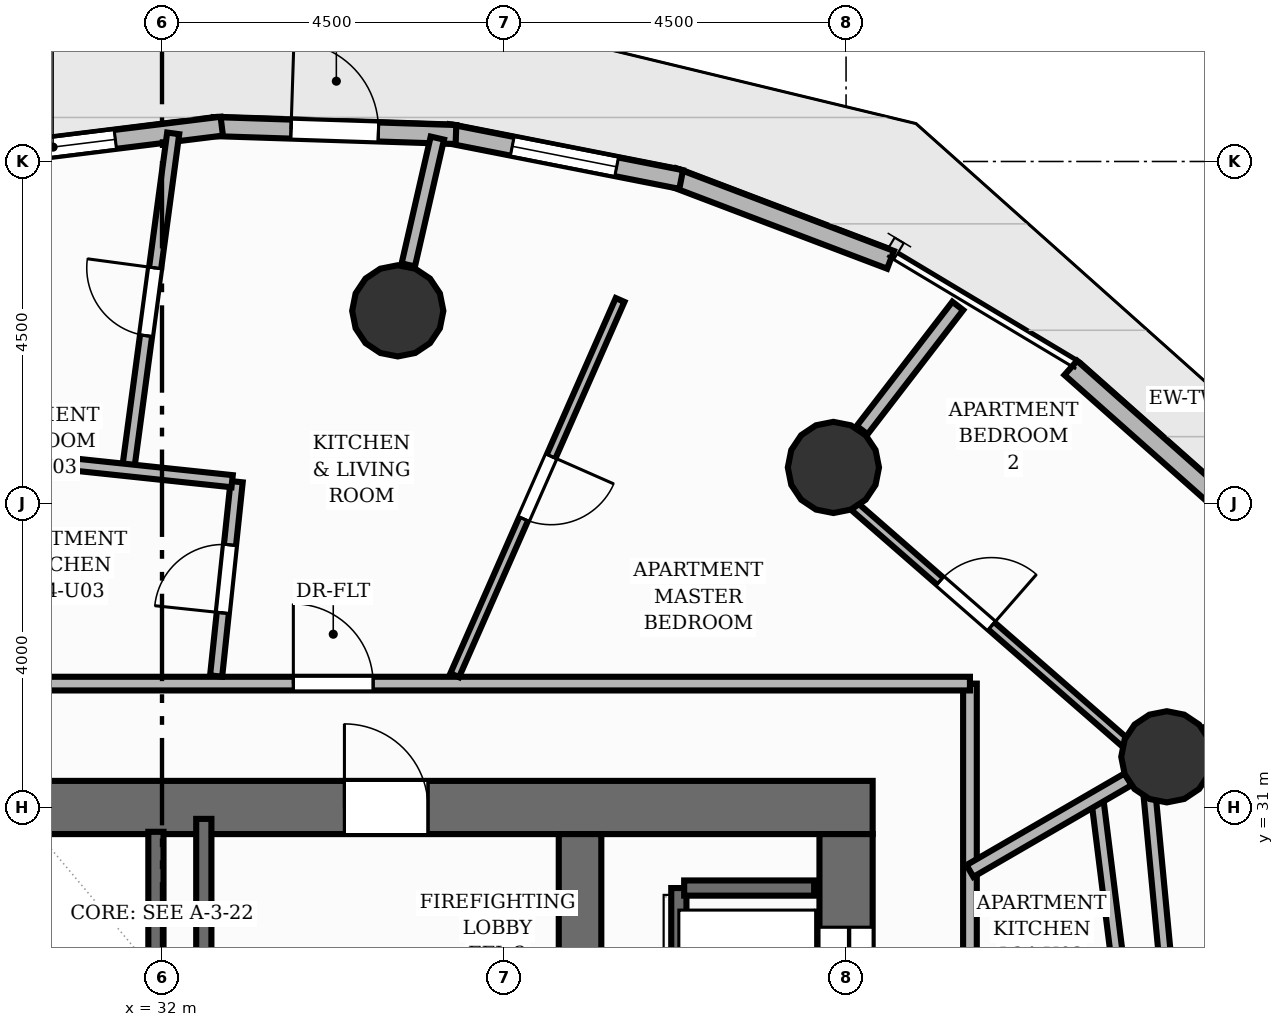
"""IFC4 building model, lengths in metres.
Left out: names, types, materials, properties, quantities, classifications, styles, units other than length and angle.
Written with IfcOpenShell. Run it as: python <this file> out.ifc"""

import sys

from ifc_helpers import new_model, si_unit, direction, frame, frame_2d, origin, origin_2d, place, context, subcontext, project, spatial, rectangle, circle, extrude, element, fill, save


model = new_model("IFC4")
c1 = context("Model", 3, precision=1e-05, world=origin(), true_north=direction((0.0, 1.0)))
c2 = subcontext(c1, "Body", "Model", "MODEL_VIEW")
j1 = project(units=[si_unit("LENGTHUNIT", "METRE"), si_unit("PLANEANGLEUNIT", "RADIAN")], contexts=[c1])
p1 = place(None, origin())
s1 = spatial("IfcSite", under=j1, at=p1, CompositionType="ELEMENT")
p2 = place(p1, origin())
s2 = spatial("IfcBuilding", under=s1, at=p2, CompositionType="ELEMENT")
p3 = place(p2, frame((0.0, 0.0, 83.68)))
s3 = spatial("IfcBuildingStorey", under=s2, at=p3, CompositionType="ELEMENT", Elevation=83.68)
p4 = place(p3, frame((22.65, 31.0, 0.0), z_axis=(0.0, 0.0, 1.0), x_axis=(1.0, 0.0, 0.0)))
e1 = element("IfcWall", 1, at=p4, inside=s3, PredefinedType="SHEAR", context=c2, shape_type="SweptSolid", body=[
    extrude(rectangle(XDim=18.7, YDim=0.7, at=frame_2d((9.35, 0.0))), origin(), (0.0, 0.0, 1.0), 3.2),
])
p5 = place(p4, frame((11.75, 0.0, 0.0)))
e2 = element("IfcOpeningElement", 2, at=p5, cuts=e1, PredefinedType="OPENING", context=c2, shape_type="SweptSolid", body=[
    extrude(rectangle(XDim=1.1, YDim=2.15, at=frame_2d((0.55, 1.075))), frame((0.0, 0.36, 0.0), z_axis=(0.0, -1.0, 0.0), x_axis=(1.0, 0.0, 0.0)), (0.0, 0.0, 1.0), 0.72),
])
p6 = place(p3, frame((41.0, 17.35, 0.0), z_axis=(0.0, 0.0, 1.0), x_axis=(0.0, 1.0, 0.0)))
e3 = element("IfcWall", 3, at=p6, inside=s3, PredefinedType="SHEAR", context=c2, shape_type="SweptSolid", body=[
    extrude(rectangle(XDim=13.3, YDim=0.7, at=frame_2d((6.65, 0.0))), origin(), (0.0, 0.0, 1.0), 3.2),
])
p7 = place(p6, frame((1.225, 0.0, 0.0)))
e4 = element("IfcOpeningElement", 4, at=p7, cuts=e3, PredefinedType="OPENING", context=c2, shape_type="SweptSolid", body=[
    extrude(rectangle(XDim=1.05, YDim=2.15, at=frame_2d((0.525, 1.075))), frame((0.0, 0.36, 0.0), z_axis=(0.0, -1.0, 0.0), x_axis=(1.0, 0.0, 0.0)), (0.0, 0.0, 1.0), 0.72),
])
p8 = place(p6, frame((4.475, 0.0, 0.0)))
e5 = element("IfcOpeningElement", 5, at=p8, cuts=e3, PredefinedType="OPENING", context=c2, shape_type="SweptSolid", body=[
    extrude(rectangle(XDim=1.05, YDim=2.15, at=frame_2d((0.525, 1.075))), frame((0.0, 0.36, 0.0), z_axis=(0.0, -1.0, 0.0), x_axis=(1.0, 0.0, 0.0)), (0.0, 0.0, 1.0), 0.72),
])
p9 = place(p6, frame((7.775, 0.0, 0.0)))
e6 = element("IfcOpeningElement", 6, at=p9, cuts=e3, PredefinedType="OPENING", context=c2, shape_type="SweptSolid", body=[
    extrude(rectangle(XDim=1.05, YDim=2.15, at=frame_2d((0.525, 1.075))), frame((0.0, 0.36, 0.0), z_axis=(0.0, -1.0, 0.0), x_axis=(1.0, 0.0, 0.0)), (0.0, 0.0, 1.0), 0.72),
])
p10 = place(p6, frame((11.025, 0.0, 0.0)))
e7 = element("IfcOpeningElement", 7, at=p10, cuts=e3, PredefinedType="OPENING", context=c2, shape_type="SweptSolid", body=[
    extrude(rectangle(XDim=1.05, YDim=2.15, at=frame_2d((0.525, 1.075))), frame((0.0, 0.36, 0.0), z_axis=(0.0, -1.0, 0.0), x_axis=(1.0, 0.0, 0.0)), (0.0, 0.0, 1.0), 0.72),
])
p11 = place(p3, frame((37.5, 17.35, 0.0), z_axis=(0.0, 0.0, 1.0), x_axis=(0.0, 1.0, 0.0)))
e8 = element("IfcWall", 8, at=p11, inside=s3, PredefinedType="SHEAR", context=c2, shape_type="SweptSolid", body=[
    extrude(rectangle(XDim=13.3, YDim=0.56, at=frame_2d((6.65, 0.0))), origin(), (0.0, 0.0, 1.0), 3.2),
])
for number, where, z_axis, x_axis in (
    (9, (45.22, 31.667, 0.0), (0.0, 0.0, 1.0), (1.0, 0.0, 0.0)),
    (10, (40.833, 35.474, 0.0), (0.0, 0.0, 1.0), (1.0, 0.0, 0.0)),
    (11, (35.102, 37.535, 0.0), (0.0, 0.0, 1.0), (1.0, 0.0, 0.0)),
):
    element("IfcColumn", number, at=place(p3, frame(where, z_axis=z_axis, x_axis=x_axis)), inside=s3, PredefinedType="COLUMN", context=c2, shape_type="SweptSolid", body=[
        extrude(circle(Radius=0.6, at=origin_2d()), origin(), (0.0, 0.0, 1.0), 3.2),
    ])
p12 = place(p3, frame((43.957, 36.784, 0.0), z_axis=(0.0, 0.0, 1.0), x_axis=(0.747828492436, -0.663891968547, 0.0)))
e12 = element("IfcWall", 12, at=p12, inside=s3, PredefinedType="SOLIDWALL", context=c2, shape_type="SweptSolid", body=[
    extrude(rectangle(XDim=2.923, YDim=0.25, at=frame_2d((1.461, 0.0))), origin(), (0.0, 0.0, 1.0), 2.96),
])
p13 = place(p3, frame((38.724, 39.293, 0.0), z_axis=(0.0, 0.0, 1.0), x_axis=(0.934815891493, -0.355132720277, 0.0)))
e13 = element("IfcWall", 13, at=p13, inside=s3, PredefinedType="SOLIDWALL", context=c2, shape_type="SweptSolid", body=[
    extrude(rectangle(XDim=3.061, YDim=0.25, at=frame_2d((1.53, 0.0))), origin(), (0.0, 0.0, 1.0), 2.96),
])
p14 = place(p3, frame((35.758, 39.867, 0.0), z_axis=(0.0, 0.0, 1.0), x_axis=(0.981187677549, -0.193056316721, 0.0)))
e14 = element("IfcWall", 14, at=p14, inside=s3, PredefinedType="SOLIDWALL", context=c2, shape_type="SweptSolid", body=[
    extrude(rectangle(XDim=3.131, YDim=0.25, at=frame_2d((1.565, 0.0))), origin(), (0.0, 0.0, 1.0), 2.96),
])
p15 = place(p14, frame((0.866, 0.0, 0.85)))
e15 = element("IfcOpeningElement", 15, at=p15, cuts=e14, PredefinedType="OPENING", context=c2, shape_type="SweptSolid", body=[
    extrude(rectangle(XDim=1.4, YDim=1.55, at=frame_2d((0.7, 0.775))), frame((0.0, 0.135, 0.0), z_axis=(0.0, -1.0, 0.0), x_axis=(1.0, 0.0, 0.0)), (0.0, 0.0, 1.0), 0.27),
])
p16 = place(p3, frame((32.677, 39.959, 0.0), z_axis=(0.0, 0.0, 1.0), x_axis=(0.999464092211, -0.032734208101, 0.0)))
e16 = element("IfcWall", 16, at=p16, inside=s3, PredefinedType="SOLIDWALL", context=c2, shape_type="SweptSolid", body=[
    extrude(rectangle(XDim=3.192, YDim=0.25, at=frame_2d((1.596, 0.0))), origin(), (0.0, 0.0, 1.0), 2.96),
])
p17 = place(p16, frame((1.021, 0.0, 0.0)))
e17 = element("IfcOpeningElement", 17, at=p17, cuts=e16, PredefinedType="OPENING", context=c2, shape_type="SweptSolid", body=[
    extrude(rectangle(XDim=1.15, YDim=2.2, at=frame_2d((0.575, 1.1))), frame((0.0, 0.135, 0.0), z_axis=(0.0, -1.0, 0.0), x_axis=(1.0, 0.0, 0.0)), (0.0, 0.0, 1.0), 0.27),
])
p18 = place(p3, frame((29.575, 39.566, 0.0), z_axis=(0.0, 0.0, 1.0), x_axis=(0.99241077266, 0.122966899235, 0.0)))
e18 = element("IfcWall", 18, at=p18, inside=s3, PredefinedType="SOLIDWALL", context=c2, shape_type="SweptSolid", body=[
    extrude(rectangle(XDim=3.236, YDim=0.25, at=frame_2d((1.618, 0.0))), origin(), (0.0, 0.0, 1.0), 2.96),
])
p19 = place(p18, frame((0.175, 0.0, 0.85)))
e19 = element("IfcOpeningElement", 19, at=p19, cuts=e18, PredefinedType="OPENING", context=c2, shape_type="SweptSolid", body=[
    extrude(rectangle(XDim=1.65, YDim=1.55, at=frame_2d((0.825, 0.775))), frame((0.0, 0.135, 0.0), z_axis=(0.0, -1.0, 0.0), x_axis=(1.0, 0.0, 0.0)), (0.0, 0.0, 1.0), 0.27),
])
p20 = place(p3, frame((32.55, 27.35, 0.0), z_axis=(0.0, 0.0, 1.0), x_axis=(0.0, 1.0, 0.0)))
e20 = element("IfcWall", 20, at=p20, inside=s3, PredefinedType="SHEAR", context=c2, shape_type="SweptSolid", body=[
    extrude(rectangle(XDim=3.5, YDim=0.2, at=frame_2d((1.75, 0.0))), origin(), (0.0, 0.0, 1.0), 3.2),
])
p21 = place(p3, frame((38.8, 18.06, 0.0), z_axis=(0.0, 0.0, 1.0), x_axis=(0.0, 1.0, 0.0)))
e21 = element("IfcWall", 21, at=p21, inside=s3, PredefinedType="SHEAR", context=c2, shape_type="SweptSolid", body=[
    extrude(rectangle(XDim=11.88, YDim=0.2, at=frame_2d((5.94, 0.0))), origin(), (0.0, 0.0, 1.0), 3.2),
])
p22 = place(p3, frame((38.87, 29.94, 0.0), z_axis=(0.0, 0.0, 1.0), x_axis=(1.0, 0.0, 0.0)))
e22 = element("IfcWall", 22, at=p22, inside=s3, PredefinedType="SHEAR", context=c2, shape_type="SweptSolid", body=[
    extrude(rectangle(XDim=1.71, YDim=0.2, at=frame_2d((0.855, 0.0))), origin(), (0.0, 0.0, 1.0), 3.2),
])
p23 = place(p3, frame((31.92, 29.02, 0.0), z_axis=(0.0, 0.0, 1.0), x_axis=(0.0, 1.0, 0.0)))
e23 = element("IfcWall", 23, at=p23, inside=s3, PredefinedType="SHEAR", context=c2, shape_type="SweptSolid", body=[
    extrude(rectangle(XDim=1.66, YDim=0.2, at=frame_2d((0.83, 0.0))), origin(), (0.0, 0.0, 1.0), 3.2),
])
p24 = place(p3, frame((45.757, 31.978, 0.0), z_axis=(0.0, 0.0, 1.0), x_axis=(0.865046065875, 0.501692439563, 0.0)))
e24 = element("IfcWall", 24, at=p24, inside=s3, PredefinedType="PARTITIONING", context=c2, shape_type="SweptSolid", body=[
    extrude(rectangle(XDim=1.994, YDim=0.18, at=frame_2d((0.997, 0.0))), origin(), (0.0, 0.0, 1.0), 2.261),
])
p25 = place(p3, frame((41.212, 35.966, 0.0), z_axis=(0.0, 0.0, 1.0), x_axis=(0.609991040385, 0.792408310564, 0.0)))
e25 = element("IfcWall", 25, at=p25, inside=s3, PredefinedType="PARTITIONING", context=c2, shape_type="SweptSolid", body=[
    extrude(rectangle(XDim=2.062, YDim=0.18, at=frame_2d((1.031, 0.0))), origin(), (0.0, 0.0, 1.0), 2.261),
])
p26 = place(p3, frame((35.24, 38.139, 0.0), z_axis=(0.0, 0.0, 1.0), x_axis=(0.223359217097, 0.974736200281, 0.0)))
e26 = element("IfcWall", 26, at=p26, inside=s3, PredefinedType="PARTITIONING", context=c2, shape_type="SweptSolid", body=[
    extrude(rectangle(XDim=1.712, YDim=0.18, at=frame_2d((0.856, 0.0))), origin(), (0.0, 0.0, 1.0), 2.261),
])
p27 = place(p3, frame((42.63, 32.63, 0.0), z_axis=(0.0, 0.0, 1.0), x_axis=(0.0, -1.0, 0.0)))
e27 = element("IfcWall", 27, at=p27, inside=s3, PredefinedType="PARTITIONING", context=c2, shape_type="SweptSolid", body=[
    extrude(rectangle(XDim=6.23, YDim=0.18, at=frame_2d((3.115, 0.0))), origin(), (0.0, 0.0, 1.0), 2.955),
])
p28 = place(p3, frame((22.351, 32.63, 0.0), z_axis=(0.0, 0.0, 1.0), x_axis=(1.0, 0.0, 0.0)))
e28 = element("IfcWall", 28, at=p28, inside=s3, PredefinedType="PARTITIONING", context=c2, shape_type="SweptSolid", body=[
    extrude(rectangle(XDim=20.279, YDim=0.18, at=frame_2d((10.14, 0.0))), origin(), (0.0, 0.0, 1.0), 2.955),
])
p29 = place(p28, frame((11.378, 0.0, 0.0)))
e29 = element("IfcOpeningElement", 29, at=p29, cuts=e28, PredefinedType="OPENING", context=c2, shape_type="SweptSolid", body=[
    extrude(rectangle(XDim=1.05, YDim=2.15, at=frame_2d((0.525, 1.075))), frame((0.0, 0.1, 0.0), z_axis=(0.0, -1.0, 0.0), x_axis=(1.0, 0.0, 0.0)), (0.0, 0.0, 1.0), 0.2),
])
p30 = place(p3, frame((44.997, 31.13, 0.0), z_axis=(0.0, 0.0, 1.0), x_axis=(0.094558062352, -0.995519348302, 0.0)))
e30 = element("IfcWall", 30, at=p30, inside=s3, PredefinedType="PLUMBINGWALL", context=c2, shape_type="SweptSolid", body=[
    extrude(rectangle(XDim=3.075, YDim=0.16, at=frame_2d((1.538, 0.0))), origin(), (0.0, 0.0, 1.0), 2.955),
])
p31 = place(p3, frame((45.01, 25.473, 0.0), z_axis=(0.0, 0.0, 1.0), x_axis=(-0.123955741663, 0.992287747636, 0.0)))
e31 = element("IfcWall", 31, at=p31, inside=s3, PredefinedType="PLUMBINGWALL", context=c2, shape_type="SweptSolid", body=[
    extrude(rectangle(XDim=5.706, YDim=0.16, at=frame_2d((2.853, 0.0))), origin(), (0.0, 0.0, 1.0), 2.955),
])
p32 = place(p31, frame((1.563, 0.0, 0.0)))
e32 = element("IfcOpeningElement", 32, at=p32, cuts=e31, PredefinedType="OPENING", context=c2, shape_type="SweptSolid", body=[
    extrude(rectangle(XDim=0.9, YDim=2.1, at=frame_2d((0.45, 1.05))), frame((0.0, 0.09, 0.0), z_axis=(0.0, -1.0, 0.0), x_axis=(1.0, 0.0, 0.0)), (0.0, 0.0, 1.0), 0.18),
])
p33 = place(p3, frame((42.63, 30.165, 0.0), z_axis=(0.0, 0.0, 1.0), x_axis=(0.86502326608, 0.501731750182, 0.0)))
e33 = element("IfcWall", 33, at=p33, inside=s3, PredefinedType="PARTITIONING", context=c2, shape_type="SweptSolid", body=[
    extrude(rectangle(XDim=2.407, YDim=0.18, at=frame_2d((1.204, 0.0))), origin(), (0.0, 0.0, 1.0), 2.261),
])
p34 = place(p3, frame((31.552, 35.438, 0.0), z_axis=(0.0, 0.0, 1.0), x_axis=(0.132986130607, 0.991117898671, 0.0)))
e34 = element("IfcWall", 34, at=p34, inside=s3, PredefinedType="PLUMBINGWALL", context=c2, shape_type="SweptSolid", body=[
    extrude(rectangle(XDim=4.472, YDim=0.16, at=frame_2d((2.236, 0.0))), origin(), (0.0, 0.0, 1.0), 2.955),
])
p35 = place(p34, frame((1.786, 0.0, 0.0)))
e35 = element("IfcOpeningElement", 35, at=p35, cuts=e34, PredefinedType="OPENING", context=c2, shape_type="SweptSolid", body=[
    extrude(rectangle(XDim=0.9, YDim=2.1, at=frame_2d((0.45, 1.05))), frame((0.0, 0.09, 0.0), z_axis=(0.0, -1.0, 0.0), x_axis=(1.0, 0.0, 0.0)), (0.0, 0.0, 1.0), 0.18),
])
p36 = place(p3, frame((38.027, 37.678, 0.0), z_axis=(0.0, 0.0, 1.0), x_axis=(-0.403235845427, -0.91509608947, 0.0)))
e36 = element("IfcWall", 36, at=p36, inside=s3, PredefinedType="PARTITIONING", context=c2, shape_type="SweptSolid", body=[
    extrude(rectangle(XDim=5.396, YDim=0.125, at=frame_2d((2.698, 0.0))), origin(), (0.0, 0.0, 1.0), 2.955),
])
p37 = place(p36, frame((2.248, 0.0, 0.0)))
e37 = element("IfcOpeningElement", 37, at=p37, cuts=e36, PredefinedType="OPENING", context=c2, shape_type="SweptSolid", body=[
    extrude(rectangle(XDim=0.9, YDim=2.1, at=frame_2d((0.45, 1.05))), frame((0.0, 0.073, 0.0), z_axis=(0.0, -1.0, 0.0), x_axis=(1.0, 0.0, 0.0)), (0.0, 0.0, 1.0), 0.145),
])
p38 = place(p3, frame((32.712, 32.729, 0.0), z_axis=(0.0, 0.0, 1.0), x_axis=(0.105094954285, 0.994462191631, 0.0)))
e38 = element("IfcWall", 38, at=p38, inside=s3, PredefinedType="PLUMBINGWALL", context=c2, shape_type="SweptSolid", body=[
    extrude(rectangle(XDim=2.572, YDim=0.16, at=frame_2d((1.286, 0.0))), origin(), (0.0, 0.0, 1.0), 2.641),
])
p39 = place(p38, frame((0.836, 0.0, 0.0)))
e39 = element("IfcOpeningElement", 39, at=p39, cuts=e38, PredefinedType="OPENING", context=c2, shape_type="SweptSolid", body=[
    extrude(rectangle(XDim=0.9, YDim=2.1, at=frame_2d((0.45, 1.05))), frame((0.0, 0.09, 0.0), z_axis=(0.0, -1.0, 0.0), x_axis=(1.0, 0.0, 0.0)), (0.0, 0.0, 1.0), 0.18),
])
p40 = place(p3, frame((32.923, 35.293, 0.0), z_axis=(0.0, 0.0, 1.0), x_axis=(-0.994472124215, 0.105000924563, 0.0)))
e40 = element("IfcWall", 40, at=p40, inside=s3, PredefinedType="PLUMBINGWALL", context=c2, shape_type="SweptSolid", body=[
    extrude(rectangle(XDim=3.618, YDim=0.16, at=frame_2d((1.809, 0.0))), origin(), (0.0, 0.0, 1.0), 2.955),
])
p41 = place(p3, frame((41.112, 34.96, 0.0), z_axis=(0.0, 0.0, 1.0), x_axis=(0.753425123405, -0.657533712765, 0.0)))
e41 = element("IfcWall", 41, at=p41, inside=s3, PredefinedType="PARTITIONING", context=c2, shape_type="SweptSolid", body=[
    extrude(rectangle(XDim=4.72, YDim=0.125, at=frame_2d((2.36, 0.0))), origin(), (0.0, 0.0, 1.0), 2.404),
])
p42 = place(p41, frame((1.49, 0.0, 0.0)))
e42 = element("IfcOpeningElement", 42, at=p42, cuts=e41, PredefinedType="OPENING", context=c2, shape_type="SweptSolid", body=[
    extrude(rectangle(XDim=0.9, YDim=2.1, at=frame_2d((0.45, 1.05))), frame((0.0, 0.073, 0.0), z_axis=(0.0, -1.0, 0.0), x_axis=(1.0, 0.0, 0.0)), (0.0, 0.0, 1.0), 0.145),
])
p43 = place(p17, origin())
e43 = element("IfcDoor", 43, at=p43, inside=s3, OperationType="SINGLE_SWING_LEFT", PredefinedType="DOOR", context=c2, shape_type="SweptSolid", body=[
    extrude(rectangle(XDim=1.15, YDim=2.2, at=frame_2d((0.575, 1.1))), frame((0.0, 0.025, 0.0), z_axis=(0.0, -1.0, 0.0), x_axis=(1.0, 0.0, 0.0)), (0.0, 0.0, 1.0), 0.05),
])
fill(e17, e43)
p44 = place(p15, origin())
e44 = element("IfcWindow", 44, at=p44, inside=s3, PartitioningType="SINGLE_PANEL", PredefinedType="WINDOW", context=c2, shape_type="SweptSolid", body=[
    extrude(rectangle(XDim=1.4, YDim=1.55, at=frame_2d((0.7, 0.775))), frame((0.0, 0.03, 0.0), z_axis=(0.0, -1.0, 0.0), x_axis=(1.0, 0.0, 0.0)), (0.0, 0.0, 1.0), 0.06),
])
fill(e15, e44)
p45 = place(p19, origin())
e45 = element("IfcWindow", 45, at=p45, inside=s3, PartitioningType="SINGLE_PANEL", PredefinedType="WINDOW", context=c2, shape_type="SweptSolid", body=[
    extrude(rectangle(XDim=1.65, YDim=1.55, at=frame_2d((0.825, 0.775))), frame((0.0, 0.03, 0.0), z_axis=(0.0, -1.0, 0.0), x_axis=(1.0, 0.0, 0.0)), (0.0, 0.0, 1.0), 0.06),
])
fill(e19, e45)
p46 = place(p5, origin())
e46 = element("IfcDoor", 46, at=p46, inside=s3, OperationType="SINGLE_SWING_LEFT", PredefinedType="DOOR", context=c2, shape_type="SweptSolid", body=[
    extrude(rectangle(XDim=1.1, YDim=2.15, at=frame_2d((0.55, 1.075))), frame((0.0, 0.025, 0.0), z_axis=(0.0, -1.0, 0.0), x_axis=(1.0, 0.0, 0.0)), (0.0, 0.0, 1.0), 0.05),
])
fill(e2, e46)
p47 = place(p10, origin())
e47 = element("IfcDoor", 47, at=p47, inside=s3, OperationType="DOUBLE_DOOR_SLIDING", PredefinedType="DOOR", context=c2, shape_type="SweptSolid", body=[
    extrude(rectangle(XDim=1.05, YDim=2.15, at=frame_2d((0.525, 1.075))), frame((0.0, 0.025, 0.0), z_axis=(0.0, -1.0, 0.0), x_axis=(1.0, 0.0, 0.0)), (0.0, 0.0, 1.0), 0.05),
])
fill(e7, e47)
p48 = place(p29, origin())
e48 = element("IfcDoor", 48, at=p48, inside=s3, OperationType="SINGLE_SWING_LEFT", PredefinedType="DOOR", context=c2, shape_type="SweptSolid", body=[
    extrude(rectangle(XDim=1.05, YDim=2.15, at=frame_2d((0.525, 1.075))), frame((0.0, 0.025, 0.0), z_axis=(0.0, -1.0, 0.0), x_axis=(1.0, 0.0, 0.0)), (0.0, 0.0, 1.0), 0.05),
])
fill(e29, e48)
p49 = place(p35, origin())
e49 = element("IfcDoor", 49, at=p49, inside=s3, OperationType="SINGLE_SWING_RIGHT", PredefinedType="DOOR", context=c2, shape_type="SweptSolid", body=[
    extrude(rectangle(XDim=0.9, YDim=2.1, at=frame_2d((0.45, 1.05))), frame((0.0, 0.025, 0.0), z_axis=(0.0, -1.0, 0.0), x_axis=(1.0, 0.0, 0.0)), (0.0, 0.0, 1.0), 0.05),
])
fill(e35, e49)
p50 = place(p37, origin())
e50 = element("IfcDoor", 50, at=p50, inside=s3, OperationType="SINGLE_SWING_LEFT", PredefinedType="DOOR", context=c2, shape_type="SweptSolid", body=[
    extrude(rectangle(XDim=0.9, YDim=2.1, at=frame_2d((0.45, 1.05))), frame((0.0, 0.025, 0.0), z_axis=(0.0, -1.0, 0.0), x_axis=(1.0, 0.0, 0.0)), (0.0, 0.0, 1.0), 0.05),
])
fill(e37, e50)
p51 = place(p42, origin())
e51 = element("IfcDoor", 51, at=p51, inside=s3, OperationType="SINGLE_SWING_RIGHT", PredefinedType="DOOR", context=c2, shape_type="SweptSolid", body=[
    extrude(rectangle(XDim=0.9, YDim=2.1, at=frame_2d((0.45, 1.05))), frame((0.0, 0.025, 0.0), z_axis=(0.0, -1.0, 0.0), x_axis=(1.0, 0.0, 0.0)), (0.0, 0.0, 1.0), 0.05),
])
fill(e42, e51)
p52 = place(p39, origin())
e52 = element("IfcDoor", 52, at=p52, inside=s3, OperationType="SINGLE_SWING_LEFT", PredefinedType="DOOR", context=c2, shape_type="SweptSolid", body=[
    extrude(rectangle(XDim=0.9, YDim=2.1, at=frame_2d((0.45, 1.05))), frame((0.0, 0.025, 0.0), z_axis=(0.0, -1.0, 0.0), x_axis=(1.0, 0.0, 0.0)), (0.0, 0.0, 1.0), 0.05),
])
fill(e39, e52)
save(model, sys.argv[1])
